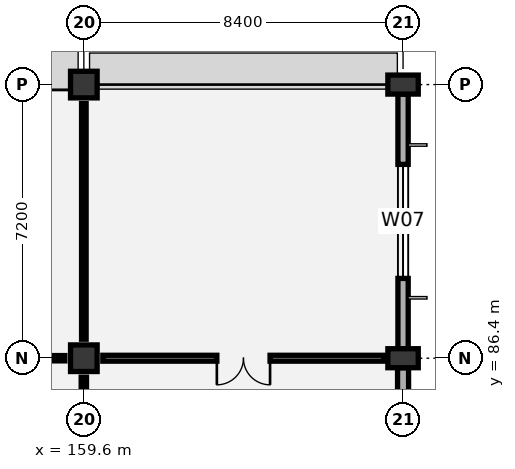
"""IFC4 building model, lengths in metres.
Left out: names, types, materials, properties, quantities, classifications, styles, units other than length and angle.
Written with IfcOpenShell. Run it as: python <this file> out.ifc"""

import sys

from ifc_helpers import new_model, si_unit, direction, frame, frame_2d, origin, origin_2d, place, context, subcontext, project, spatial, rectangle, extrude, element, fill, save


model = new_model("IFC4")
c1 = context("Model", 3, precision=1e-05, world=origin(), true_north=direction((0.0, 1.0)))
c2 = subcontext(c1, "Body", "Model", "MODEL_VIEW")
j1 = project(units=[si_unit("LENGTHUNIT", "METRE"), si_unit("PLANEANGLEUNIT", "RADIAN")], contexts=[c1])
p1 = place(None, origin())
s1 = spatial("IfcSite", under=j1, at=p1, CompositionType="ELEMENT")
p2 = place(p1, origin())
s2 = spatial("IfcBuilding", under=s1, at=p2, CompositionType="ELEMENT")
p3 = place(p2, frame((0.0, 0.0, 6.0)))
s3 = spatial("IfcBuildingStorey", under=s2, at=p3, CompositionType="ELEMENT", Elevation=6.0)
for number, where, z_axis, x_axis in (
    (1, (159.6, 86.4, 0.0), (0.0, 0.0, 1.0), (1.0, 0.0, 0.0)),
    (2, (159.6, 93.6, 0.0), (0.0, 0.0, 1.0), (1.0, 0.0, 0.0)),
):
    element("IfcColumn", number, at=place(p3, frame(where, z_axis=z_axis, x_axis=x_axis)), inside=s3, PredefinedType="COLUMN", context=c2, shape_type="SweptSolid", body=[
        extrude(rectangle(XDim=0.7, YDim=0.7, at=origin_2d()), origin(), (0.0, 0.0, 1.0), 5.4),
    ])
for number, where, z_axis, x_axis in (
    (3, (168.0, 86.4, 0.0), (0.0, 0.0, 1.0), (0.0, 1.0, 0.0)),
    (4, (168.0, 93.6, 0.0), (0.0, 0.0, 1.0), (0.0, 1.0, 0.0)),
):
    element("IfcColumn", number, at=place(p3, frame(where, z_axis=z_axis, x_axis=x_axis)), inside=s3, PredefinedType="COLUMN", context=c2, shape_type="SweptSolid", body=[
        extrude(rectangle(XDim=0.5, YDim=0.8, at=origin_2d()), origin(), (0.0, 0.0, 1.0), 5.4),
    ])
p4 = place(p3, frame((151.55, 93.6, 0.0), z_axis=(0.0, 0.0, 1.0), x_axis=(1.0, 0.0, 0.0)))
e5 = element("IfcWall", 5, at=p4, inside=s3, PredefinedType="SOLIDWALL", context=c2, shape_type="SweptSolid", body=[
    extrude(rectangle(XDim=7.7, YDim=0.215, at=frame_2d((3.85, 0.0))), origin(), (0.0, 0.0, 1.0), 4.52),
])
p5 = place(p4, frame((2.35, 0.0, 0.9)))
e6 = element("IfcOpeningElement", 6, at=p5, cuts=e5, PredefinedType="OPENING", context=c2, shape_type="SweptSolid", body=[
    extrude(rectangle(XDim=3.0, YDim=2.4, at=frame_2d((1.5, 1.2))), frame((0.0, 0.117, 0.0), z_axis=(0.0, -1.0, 0.0), x_axis=(1.0, 0.0, 0.0)), (0.0, 0.0, 1.0), 0.235),
])
p6 = place(p3, frame((168.0, 79.45, 0.0), z_axis=(0.0, 0.0, 1.0), x_axis=(0.0, 1.0, 0.0)))
e7 = element("IfcWall", 7, at=p6, inside=s3, PredefinedType="SOLIDWALL", context=c2, shape_type="SweptSolid", body=[
    extrude(rectangle(XDim=6.7, YDim=0.29, at=frame_2d((3.35, 0.0))), origin(), (0.0, 0.0, 1.0), 4.52),
])
p7 = place(p6, frame((1.033, 0.0, 0.9)))
e8 = element("IfcOpeningElement", 8, at=p7, cuts=e7, PredefinedType="OPENING", context=c2, shape_type="SweptSolid", body=[
    extrude(rectangle(XDim=1.8, YDim=2.1, at=frame_2d((0.9, 1.05))), frame((0.0, 0.155, 0.0), z_axis=(0.0, -1.0, 0.0), x_axis=(1.0, 0.0, 0.0)), (0.0, 0.0, 1.0), 0.31),
])
p8 = place(p6, frame((3.867, 0.0, 0.9)))
e9 = element("IfcOpeningElement", 9, at=p8, cuts=e7, PredefinedType="OPENING", context=c2, shape_type="SweptSolid", body=[
    extrude(rectangle(XDim=1.8, YDim=2.1, at=frame_2d((0.9, 1.05))), frame((0.0, 0.155, 0.0), z_axis=(0.0, -1.0, 0.0), x_axis=(1.0, 0.0, 0.0)), (0.0, 0.0, 1.0), 0.31),
])
p9 = place(p3, frame((168.0, 86.65, 0.0), z_axis=(0.0, 0.0, 1.0), x_axis=(0.0, 1.0, 0.0)))
e10 = element("IfcWall", 10, at=p9, inside=s3, PredefinedType="SOLIDWALL", context=c2, shape_type="SweptSolid", body=[
    extrude(rectangle(XDim=6.7, YDim=0.27, at=frame_2d((3.35, 0.0))), origin(), (0.0, 0.0, 1.0), 4.52),
])
p10 = place(p9, frame((1.85, 0.0, 0.9)))
e11 = element("IfcOpeningElement", 11, at=p10, cuts=e10, PredefinedType="OPENING", context=c2, shape_type="SweptSolid", body=[
    extrude(rectangle(XDim=3.0, YDim=2.1, at=frame_2d((1.5, 1.05))), frame((0.0, 0.145, 0.0), z_axis=(0.0, -1.0, 0.0), x_axis=(1.0, 0.0, 0.0)), (0.0, 0.0, 1.0), 0.29),
])
p11 = place(p3, frame((168.0, 93.72, 0.0), z_axis=(0.0, 0.0, 1.0), x_axis=(0.0, 1.0, 0.0)))
e12 = element("IfcWall", 12, at=p11, inside=s3, PredefinedType="PARAPET", context=c2, shape_type="SweptSolid", body=[
    extrude(rectangle(XDim=6.96, YDim=0.22, at=frame_2d((3.48, 0.0))), origin(), (0.0, 0.0, 1.0), 1.15),
])
p12 = place(p3, frame((159.6, 79.7, 0.0), z_axis=(0.0, 0.0, 1.0), x_axis=(0.0, 1.0, 0.0)))
e13 = element("IfcWall", 13, at=p12, inside=s3, PredefinedType="PARTITIONING", context=c2, shape_type="SweptSolid", body=[
    extrude(rectangle(XDim=6.2, YDim=0.14, at=frame_2d((3.1, 0.0))), origin(), (0.0, 0.0, 1.0), 4.32),
])
p13 = place(p12, frame((2.25, 0.0, 0.0)))
e14 = element("IfcOpeningElement", 14, at=p13, cuts=e13, PredefinedType="OPENING", context=c2, shape_type="SweptSolid", body=[
    extrude(rectangle(XDim=1.7, YDim=2.25, at=frame_2d((0.85, 1.125))), frame((0.0, 0.08, 0.0), z_axis=(0.0, -1.0, 0.0), x_axis=(1.0, 0.0, 0.0)), (0.0, 0.0, 1.0), 0.16),
])
p14 = place(p3, frame((151.7, 86.4, 0.0), z_axis=(0.0, 0.0, 1.0), x_axis=(1.0, 0.0, 0.0)))
e15 = element("IfcWall", 15, at=p14, inside=s3, PredefinedType="PARTITIONING", context=c2, shape_type="SweptSolid", body=[
    extrude(rectangle(XDim=7.4, YDim=0.14, at=frame_2d((3.7, 0.0))), origin(), (0.0, 0.0, 1.0), 4.27),
])
p15 = place(p14, frame((3.0, 0.0, 0.0)))
e16 = element("IfcOpeningElement", 16, at=p15, cuts=e15, PredefinedType="OPENING", context=c2, shape_type="SweptSolid", body=[
    extrude(rectangle(XDim=1.4, YDim=2.15, at=frame_2d((0.7, 1.075))), frame((0.0, 0.08, 0.0), z_axis=(0.0, -1.0, 0.0), x_axis=(1.0, 0.0, 0.0)), (0.0, 0.0, 1.0), 0.16),
])
p16 = place(p3, frame((159.6, 86.9, 0.0), z_axis=(0.0, 0.0, 1.0), x_axis=(0.0, 1.0, 0.0)))
e17 = element("IfcWall", 17, at=p16, inside=s3, PredefinedType="PARTITIONING", context=c2, shape_type="SweptSolid", body=[
    extrude(rectangle(XDim=6.2, YDim=0.12, at=frame_2d((3.1, 0.0))), origin(), (0.0, 0.0, 1.0), 4.88),
])
p17 = place(p3, frame((160.1, 86.4, 0.0), z_axis=(0.0, 0.0, 1.0), x_axis=(1.0, 0.0, 0.0)))
e18 = element("IfcWall", 18, at=p17, inside=s3, PredefinedType="PARTITIONING", context=c2, shape_type="SweptSolid", body=[
    extrude(rectangle(XDim=7.4, YDim=0.155, at=frame_2d((3.7, 0.0))), origin(), (0.0, 0.0, 1.0), 4.37),
])
p18 = place(p17, frame((3.0, 0.0, 0.0)))
e19 = element("IfcOpeningElement", 19, at=p18, cuts=e18, PredefinedType="OPENING", context=c2, shape_type="SweptSolid", body=[
    extrude(rectangle(XDim=1.4, YDim=2.15, at=frame_2d((0.7, 1.075))), frame((0.0, 0.087, 0.0), z_axis=(0.0, -1.0, 0.0), x_axis=(1.0, 0.0, 0.0)), (0.0, 0.0, 1.0), 0.175),
])
p19 = place(p10, origin())
e20 = element("IfcWindow", 20, at=p19, inside=s3, PartitioningType="SINGLE_PANEL", PredefinedType="WINDOW", context=c2, shape_type="SweptSolid", body=[
    extrude(rectangle(XDim=3.0, YDim=2.1, at=frame_2d((1.5, 1.05))), frame((0.0, 0.03, 0.0), z_axis=(0.0, -1.0, 0.0), x_axis=(1.0, 0.0, 0.0)), (0.0, 0.0, 1.0), 0.06),
])
fill(e11, e20)
p20 = place(p18, frame((1.4, 0.0, 0.0), z_axis=(0.0, 0.0, 1.0), x_axis=(-1.0, 0.0, 0.0)))
e21 = element("IfcDoor", 21, at=p20, inside=s3, OperationType="DOUBLE_DOOR_SINGLE_SWING", PredefinedType="DOOR", context=c2, shape_type="SweptSolid", body=[
    extrude(rectangle(XDim=1.4, YDim=2.15, at=frame_2d((0.7, 1.075))), frame((0.0, 0.025, 0.0), z_axis=(0.0, -1.0, 0.0), x_axis=(1.0, 0.0, 0.0)), (0.0, 0.0, 1.0), 0.05),
])
fill(e19, e21)
save(model, sys.argv[1])
